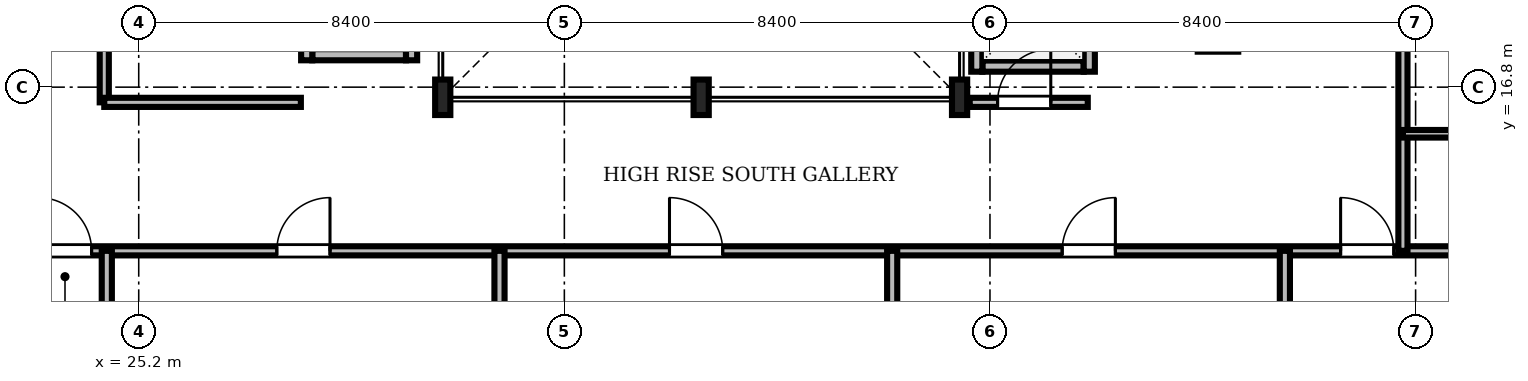
"""IFC4 building model, lengths in metres.
Left out: names, types, materials, properties, quantities, classifications, styles, units other than length and angle.
Written with IfcOpenShell. Run it as: python <this file> out.ifc"""

import sys

from ifc_helpers import new_model, si_unit, direction, frame, frame_2d, origin, origin_2d, place, context, subcontext, project, spatial, rectangle, i_section, extrude, source, transform, mapped, element, fill, save


model = new_model("IFC4")
c1 = context("Model", 3, precision=1e-05, world=origin(), true_north=direction((0.0, 1.0)))
c2 = subcontext(c1, "Body", "Model", "MODEL_VIEW")
j1 = project(units=[si_unit("LENGTHUNIT", "METRE"), si_unit("PLANEANGLEUNIT", "RADIAN")], contexts=[c1])
p1 = place(None, origin())
s1 = spatial("IfcSite", under=j1, at=p1, CompositionType="ELEMENT")
p2 = place(p1, origin())
s2 = spatial("IfcBuilding", under=s1, at=p2, CompositionType="ELEMENT")
p3 = place(p2, frame((0.0, 0.0, 192.3)))
s3 = spatial("IfcBuildingStorey", under=s2, at=p3, CompositionType="ELEMENT", Elevation=192.3)
m1 = source(origin(), c2, "Body", "SweptSolid", [
    extrude(i_section(OverallWidth=0.3, OverallDepth=0.7, WebThickness=0.017, FlangeThickness=0.032, FilletRadius=0.027, at=origin_2d()), origin(), (0.0, 0.0, 1.0), 3.53),
])
for number, where, z_axis, x_axis in (
    (1, (31.2, 16.6, 0.0), (0.0, 0.0, 1.0), (1.0, 0.0, 0.0)),
    (2, (36.3, 16.6, 0.0), (0.0, 0.0, 1.0), (1.0, 0.0, 0.0)),
    (3, (41.4, 16.6, 0.0), (0.0, 0.0, 1.0), (1.0, 0.0, 0.0)),
):
    element("IfcColumn", number, at=place(p3, frame(where, z_axis=z_axis, x_axis=x_axis)), inside=s3, PredefinedType="COLUMN", context=c2, shape_type="MappedRepresentation", body=[
        mapped(m1, transform((0.0, 0.0, 0.0), scale=1.0)),
    ])
m2 = source(origin(), c2, "Body", "SweptSolid", [
    extrude(rectangle(XDim=2.0, YDim=0.22, at=frame_2d((1.0, 0.0))), origin(), (0.0, 0.0, 1.0), 3.53),
])
p4 = place(p3, frame((41.85, 17.215, 0.0), z_axis=(0.0, 0.0, 1.0), x_axis=(1.0, 0.0, 0.0)))
e4 = element("IfcWall", 4, at=p4, inside=s3, PredefinedType="SOLIDWALL", context=c2, shape_type="MappedRepresentation", body=[
    mapped(m2, transform((0.0, 0.0, 0.0), scale=1.0)),
])
m3 = source(origin(), c2, "Body", "SweptSolid", [
    extrude(rectangle(XDim=2.19, YDim=0.22, at=frame_2d((1.095, 0.0))), origin(), (0.0, 0.0, 1.0), 3.53),
])
p5 = place(p3, frame((41.74, 17.105, 0.0), z_axis=(0.0, 0.0, 1.0), x_axis=(0.0, 1.0, 0.0)))
e5 = element("IfcWall", 5, at=p5, inside=s3, PredefinedType="SOLIDWALL", context=c2, shape_type="MappedRepresentation", body=[
    mapped(m3, transform((0.0, 0.0, 0.0), scale=1.0)),
])
p6 = place(p3, frame((43.96, 17.105, 0.0), z_axis=(0.0, 0.0, 1.0), x_axis=(0.0, 1.0, 0.0)))
e6 = element("IfcWall", 6, at=p6, inside=s3, PredefinedType="SOLIDWALL", context=c2, shape_type="MappedRepresentation", body=[
    mapped(m3, transform((0.0, 0.0, 0.0), scale=1.0)),
])
m4 = source(origin(), c2, "Body", "SweptSolid", [
    extrude(rectangle(XDim=1.1, YDim=2.2, at=frame_2d((0.55, 1.1))), frame((0.0, 0.12, 0.0), z_axis=(0.0, -1.0, 0.0), x_axis=(1.0, 0.0, 0.0)), (0.0, 0.0, 1.0), 0.24),
])
p7 = place(p6, frame((0.545, 0.0, 0.0)))
e7 = element("IfcOpeningElement", 7, at=p7, cuts=e6, PredefinedType="OPENING", context=c2, shape_type="MappedRepresentation", body=[
    mapped(m4, transform((0.0, 0.0, 0.0), scale=1.0)),
])
m5 = source(origin(), c2, "Body", "SweptSolid", [
    extrude(rectangle(XDim=1.85, YDim=0.22, at=frame_2d((0.925, 0.0))), origin(), (0.0, 0.0, 1.0), 2.972),
])
p8 = place(p3, frame((28.625, 17.44, 0.0), z_axis=(0.0, 0.0, 1.0), x_axis=(1.0, 0.0, 0.0)))
e8 = element("IfcWall", 8, at=p8, inside=s3, PredefinedType="SOLIDWALL", context=c2, shape_type="MappedRepresentation", body=[
    mapped(m5, transform((0.0, 0.0, 0.0), scale=1.0)),
])
m6 = source(origin(), c2, "Body", "SweptSolid", [
    extrude(rectangle(XDim=2.54, YDim=0.22, at=frame_2d((1.27, 0.0))), origin(), (0.0, 0.0, 1.0), 2.972),
])
p9 = place(p3, frame((28.515, 17.33, 0.0), z_axis=(0.0, 0.0, 1.0), x_axis=(0.0, 1.0, 0.0)))
e9 = element("IfcWall", 9, at=p9, inside=s3, PredefinedType="SOLIDWALL", context=c2, shape_type="MappedRepresentation", body=[
    mapped(m6, transform((0.0, 0.0, 0.0), scale=1.0)),
])
m7 = source(origin(), c2, "Body", "SweptSolid", [
    extrude(rectangle(XDim=2.54, YDim=0.22, at=frame_2d((1.27, 0.0))), origin(), (0.0, 0.0, 1.0), 3.53),
])
p10 = place(p3, frame((30.585, 17.33, 0.0), z_axis=(0.0, 0.0, 1.0), x_axis=(0.0, 1.0, 0.0)))
e10 = element("IfcWall", 10, at=p10, inside=s3, PredefinedType="SOLIDWALL", context=c2, shape_type="MappedRepresentation", body=[
    mapped(m7, transform((0.0, 0.0, 0.0), scale=1.0)),
])
m8 = source(origin(), c2, "Body", "SweptSolid", [
    extrude(rectangle(XDim=46.156, YDim=0.18, at=frame_2d((23.078, 0.0))), origin(), (0.0, 0.0, 1.0), 2.772),
])
p11 = place(p3, frame((11.422, 13.57, 0.0), z_axis=(0.0, 0.0, 1.0), x_axis=(1.0, 0.0, 0.0)))
e11 = element("IfcWall", 11, at=p11, inside=s3, PredefinedType="PARTITIONING", context=c2, shape_type="MappedRepresentation", body=[
    mapped(m8, transform((0.0, 0.0, 0.0), scale=1.0)),
])
m9 = source(origin(), c2, "Body", "SweptSolid", [
    extrude(rectangle(XDim=1.05, YDim=2.2, at=frame_2d((0.525, 1.1))), frame((0.0, 0.1, 0.0), z_axis=(0.0, -1.0, 0.0), x_axis=(1.0, 0.0, 0.0)), (0.0, 0.0, 1.0), 0.2),
])
p12 = place(p11, frame((11.798, 0.0, 0.0)))
e12 = element("IfcOpeningElement", 12, at=p12, cuts=e11, PredefinedType="OPENING", context=c2, shape_type="MappedRepresentation", body=[
    mapped(m9, transform((0.0, 0.0, 0.0), scale=1.0)),
])
p13 = place(p11, frame((16.503, 0.0, 0.0)))
e13 = element("IfcOpeningElement", 13, at=p13, cuts=e11, PredefinedType="OPENING", context=c2, shape_type="MappedRepresentation", body=[
    mapped(m9, transform((0.0, 0.0, 0.0), scale=1.0)),
])
p14 = place(p11, frame((24.253, 0.0, 0.0)))
e14 = element("IfcOpeningElement", 14, at=p14, cuts=e11, PredefinedType="OPENING", context=c2, shape_type="MappedRepresentation", body=[
    mapped(m9, transform((0.0, 0.0, 0.0), scale=1.0)),
])
p15 = place(p11, frame((32.003, 0.0, 0.0)))
e15 = element("IfcOpeningElement", 15, at=p15, cuts=e11, PredefinedType="OPENING", context=c2, shape_type="MappedRepresentation", body=[
    mapped(m9, transform((0.0, 0.0, 0.0), scale=1.0)),
])
p16 = place(p11, frame((37.498, 0.0, 0.0)))
e16 = element("IfcOpeningElement", 16, at=p16, cuts=e11, PredefinedType="OPENING", context=c2, shape_type="MappedRepresentation", body=[
    mapped(m9, transform((0.0, 0.0, 0.0), scale=1.0)),
])
m10 = source(origin(), c2, "Body", "SweptSolid", [
    extrude(rectangle(XDim=27.53, YDim=0.18, at=frame_2d((13.765, 0.0))), origin(), (0.0, 0.0, 1.0), 2.972),
])
p17 = place(p3, frame((50.15, 13.57, 0.0), z_axis=(0.0, 0.0, 1.0), x_axis=(0.0, 1.0, 0.0)))
e17 = element("IfcWall", 17, at=p17, inside=s3, PredefinedType="PARTITIONING", context=c2, shape_type="MappedRepresentation", body=[
    mapped(m10, transform((0.0, 0.0, 0.0), scale=1.0)),
])
p18 = place(p17, frame((5.217, 0.0, 0.0)))
e18 = element("IfcOpeningElement", 18, at=p18, cuts=e17, PredefinedType="OPENING", context=c2, shape_type="MappedRepresentation", body=[
    mapped(m9, transform((0.0, 0.0, 0.0), scale=1.0)),
])
p19 = place(p17, frame((14.32, 0.0, 0.0)))
e19 = element("IfcOpeningElement", 19, at=p19, cuts=e17, PredefinedType="OPENING", context=c2, shape_type="MappedRepresentation", body=[
    mapped(m9, transform((0.0, 0.0, 0.0), scale=1.0)),
])
p20 = place(p17, frame((23.423, 0.0, 0.0)))
e20 = element("IfcOpeningElement", 20, at=p20, cuts=e17, PredefinedType="OPENING", context=c2, shape_type="MappedRepresentation", body=[
    mapped(m9, transform((0.0, 0.0, 0.0), scale=1.0)),
])
m11 = source(origin(), c2, "Body", "SweptSolid", [
    extrude(rectangle(XDim=5.4, YDim=0.18, at=frame_2d((2.7, 0.0))), origin(), (0.0, 0.0, 1.0), 2.972),
])
p21 = place(p3, frame((24.52, 16.5, 0.0), z_axis=(0.0, 0.0, 1.0), x_axis=(0.0, 1.0, 0.0)))
e21 = element("IfcWall", 21, at=p21, inside=s3, PredefinedType="PARTITIONING", context=c2, shape_type="MappedRepresentation", body=[
    mapped(m11, transform((0.0, 0.0, 0.0), scale=1.0)),
])
p22 = place(p21, frame((2.0, 0.0, 0.0)))
e22 = element("IfcOpeningElement", 22, at=p22, cuts=e21, PredefinedType="OPENING", context=c2, shape_type="MappedRepresentation", body=[
    mapped(m9, transform((0.0, 0.0, 0.0), scale=1.0)),
])
m12 = source(origin(), c2, "Body", "SweptSolid", [
    extrude(rectangle(XDim=2.33, YDim=0.18, at=frame_2d((1.165, 0.0))), origin(), (0.0, 0.0, 1.0), 2.972),
])
p23 = place(p3, frame((41.6, 16.5, 0.0), z_axis=(0.0, 0.0, 1.0), x_axis=(1.0, 0.0, 0.0)))
e23 = element("IfcWall", 23, at=p23, inside=s3, PredefinedType="PARTITIONING", context=c2, shape_type="MappedRepresentation", body=[
    mapped(m12, transform((0.0, 0.0, 0.0), scale=1.0)),
])
p24 = place(p23, frame((0.55, 0.0, 0.0)))
e24 = element("IfcOpeningElement", 24, at=p24, cuts=e23, PredefinedType="OPENING", context=c2, shape_type="MappedRepresentation", body=[
    mapped(m9, transform((0.0, 0.0, 0.0), scale=1.0)),
])
m13 = source(origin(), c2, "Body", "SweptSolid", [
    extrude(rectangle(XDim=11.448, YDim=0.2, at=frame_2d((5.724, 0.0))), origin(), (0.0, 0.0, 1.0), 2.772),
])
p25 = place(p3, frame((24.57, 2.122, 0.0), z_axis=(0.0, 0.0, 1.0), x_axis=(0.0, 1.0, 0.0)))
e25 = element("IfcWall", 25, at=p25, inside=s3, PredefinedType="PARTITIONING", context=c2, shape_type="MappedRepresentation", body=[
    mapped(m13, transform((0.0, 0.0, 0.0), scale=1.0)),
])
m14 = source(origin(), c2, "Body", "SweptSolid", [
    extrude(rectangle(XDim=11.64, YDim=0.2, at=frame_2d((5.82, 0.0))), origin(), (0.0, 0.0, 1.0), 2.772),
])
p26 = place(p3, frame((32.32, 1.93, 0.0), z_axis=(0.0, 0.0, 1.0), x_axis=(0.0, 1.0, 0.0)))
e26 = element("IfcWall", 26, at=p26, inside=s3, PredefinedType="PARTITIONING", context=c2, shape_type="MappedRepresentation", body=[
    mapped(m14, transform((0.0, 0.0, 0.0), scale=1.0)),
])
for number, where, z_axis, x_axis in (
    (27, (40.07, 2.122, 0.0), (0.0, 0.0, 1.0), (0.0, 1.0, 0.0)),
    (28, (47.82, 2.122, 0.0), (0.0, 0.0, 1.0), (0.0, 1.0, 0.0)),
):
    element("IfcWall", number, at=place(p3, frame(where, z_axis=z_axis, x_axis=x_axis)), inside=s3, PredefinedType="PARTITIONING", context=c2, shape_type="MappedRepresentation", body=[
        mapped(m13, transform((0.0, 0.0, 0.0), scale=1.0)),
    ])
m15 = source(origin(), c2, "Body", "SweptSolid", [
    extrude(rectangle(XDim=3.88, YDim=0.18, at=frame_2d((1.94, 0.0))), origin(), (0.0, 0.0, 1.0), 3.53),
])
p27 = place(p3, frame((24.52, 16.5, 0.0), z_axis=(0.0, 0.0, 1.0), x_axis=(1.0, 0.0, 0.0)))
e29 = element("IfcWall", 29, at=p27, inside=s3, PredefinedType="PARTITIONING", context=c2, shape_type="MappedRepresentation", body=[
    mapped(m15, transform((0.0, 0.0, 0.0), scale=1.0)),
])
m16 = source(origin(), c2, "Body", "SweptSolid", [
    extrude(rectangle(XDim=2.36, YDim=0.15, at=frame_2d((1.18, 0.0))), origin(), (0.0, 0.0, 1.0), 3.53),
])
p28 = place(p3, frame((50.15, 15.88, 0.0), z_axis=(0.0, 0.0, 1.0), x_axis=(1.0, 0.0, 0.0)))
e30 = element("IfcWall", 30, at=p28, inside=s3, PredefinedType="PARTITIONING", context=c2, shape_type="MappedRepresentation", body=[
    mapped(m16, transform((0.0, 0.0, 0.0), scale=1.0)),
])
m17 = source(origin(), c2, "Body", "SweptSolid", [
    extrude(rectangle(XDim=1.05, YDim=2.2, at=frame_2d((0.525, 1.1))), frame((0.0, 0.025, 0.0), z_axis=(0.0, -1.0, 0.0), x_axis=(1.0, 0.0, 0.0)), (0.0, 0.0, 1.0), 0.05),
])
p29 = place(p12, origin())
e31 = element("IfcDoor", 31, at=p29, inside=s3, OperationType="SINGLE_SWING_LEFT", PredefinedType="DOOR", context=c2, shape_type="MappedRepresentation", body=[
    mapped(m17, transform((0.0, 0.0, 0.0), scale=1.0)),
])
fill(e12, e31)
p30 = place(p13, origin())
e32 = element("IfcDoor", 32, at=p30, inside=s3, OperationType="SINGLE_SWING_RIGHT", PredefinedType="DOOR", context=c2, shape_type="MappedRepresentation", body=[
    mapped(m17, transform((0.0, 0.0, 0.0), scale=1.0)),
])
fill(e13, e32)
p31 = place(p14, origin())
e33 = element("IfcDoor", 33, at=p31, inside=s3, OperationType="SINGLE_SWING_LEFT", PredefinedType="DOOR", context=c2, shape_type="MappedRepresentation", body=[
    mapped(m17, transform((0.0, 0.0, 0.0), scale=1.0)),
])
fill(e14, e33)
p32 = place(p15, origin())
e34 = element("IfcDoor", 34, at=p32, inside=s3, OperationType="SINGLE_SWING_RIGHT", PredefinedType="DOOR", context=c2, shape_type="MappedRepresentation", body=[
    mapped(m17, transform((0.0, 0.0, 0.0), scale=1.0)),
])
fill(e15, e34)
p33 = place(p16, origin())
e35 = element("IfcDoor", 35, at=p33, inside=s3, OperationType="SINGLE_SWING_LEFT", PredefinedType="DOOR", context=c2, shape_type="MappedRepresentation", body=[
    mapped(m17, transform((0.0, 0.0, 0.0), scale=1.0)),
])
fill(e16, e35)
p34 = place(p24, origin())
e36 = element("IfcDoor", 36, at=p34, inside=s3, OperationType="SINGLE_SWING_RIGHT", PredefinedType="DOOR", context=c2, shape_type="MappedRepresentation", body=[
    mapped(m17, transform((0.0, 0.0, 0.0), scale=1.0)),
])
fill(e24, e36)
save(model, sys.argv[1])
